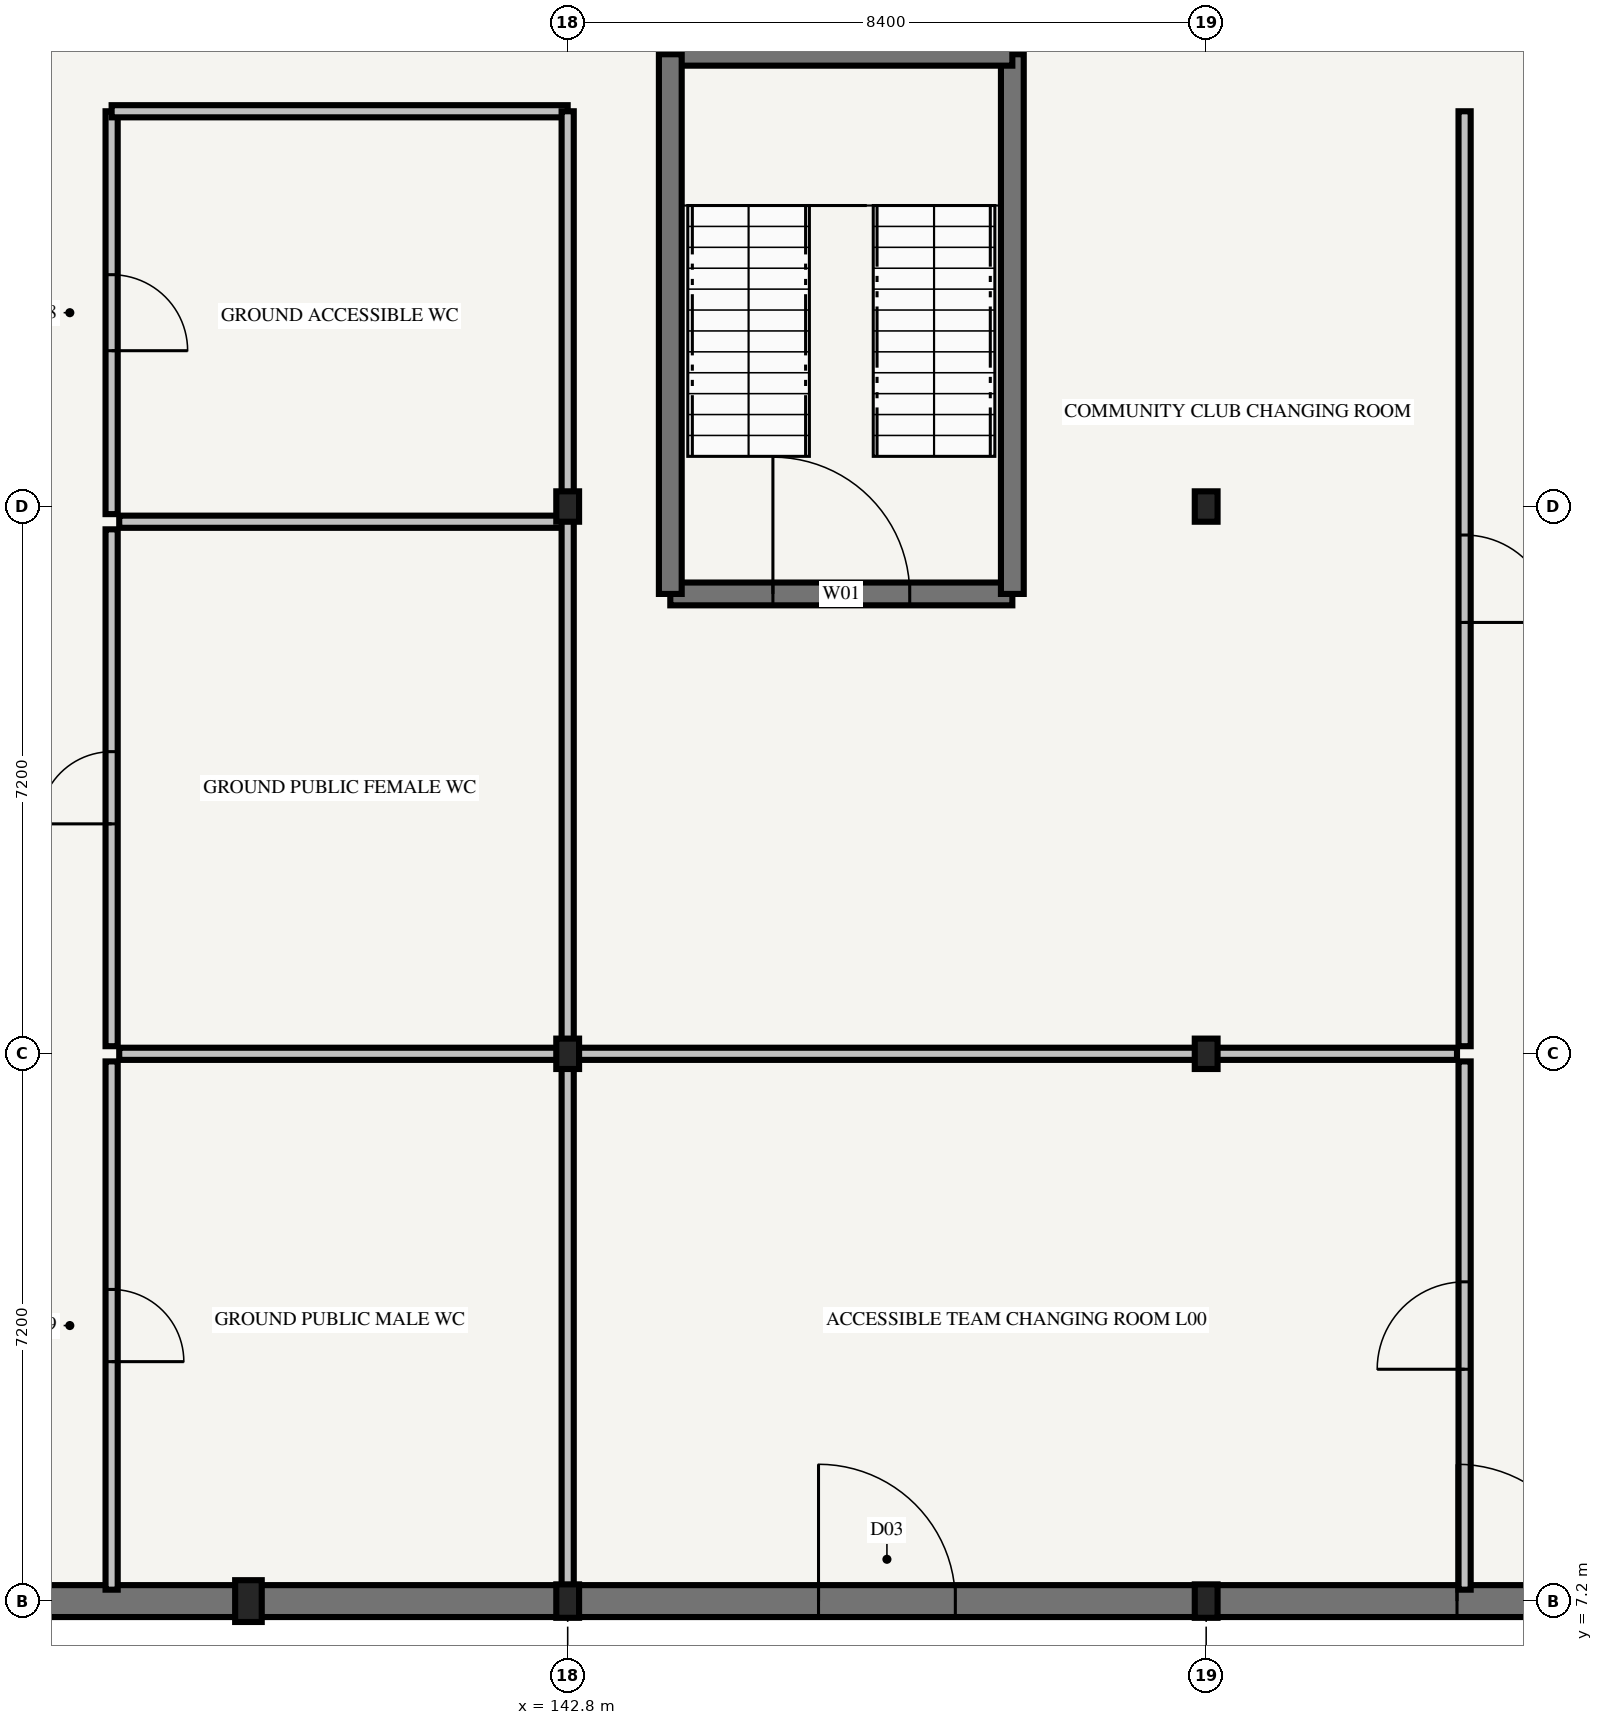
"""IFC4 building model, lengths in metres.
Left out: names, types, materials, properties, quantities, classifications, styles, units other than length and angle.
Written with IfcOpenShell. Run it as: python <this file> out.ifc"""

import sys

from ifc_helpers import new_model, si_unit, direction, frame, frame_2d, origin, origin_2d, place, context, subcontext, project, spatial, rectangle, i_section, extrude, element, fill, save


model = new_model("IFC4")
c1 = context("Model", 3, precision=1e-05, world=origin(), true_north=direction((0.0, 1.0)))
c2 = subcontext(c1, "Body", "Model", "MODEL_VIEW")
j1 = project(units=[si_unit("LENGTHUNIT", "METRE"), si_unit("PLANEANGLEUNIT", "RADIAN")], contexts=[c1])
p1 = place(None, origin())
s1 = spatial("IfcSite", under=j1, at=p1, CompositionType="ELEMENT")
p2 = place(p1, origin())
s2 = spatial("IfcBuilding", under=s1, at=p2, CompositionType="ELEMENT")
p3 = place(p2, origin())
s3 = spatial("IfcBuildingStorey", under=s2, at=p3, CompositionType="ELEMENT", Elevation=0.0)
p4 = place(p3, frame((142.8, 7.2, -0.42), z_axis=(0.0, 0.0, 1.0), x_axis=(1.0, 0.0, 0.0)))
e1 = element("IfcColumn", 1, at=p4, inside=s3, PredefinedType="COLUMN", context=c2, shape_type="SweptSolid", body=[
    extrude(i_section(OverallWidth=0.3, OverallDepth=0.44, WebThickness=0.011, FlangeThickness=0.021, FilletRadius=0.027, at=origin_2d()), origin(), (0.0, 0.0, 1.0), 4.92),
])
for number, where, z_axis, x_axis in (
    (2, (142.8, 14.4, -0.42), (0.0, 0.0, 1.0), (1.0, 0.0, 0.0)),
    (3, (142.8, 21.6, -0.42), (0.0, 0.0, 1.0), (1.0, 0.0, 0.0)),
):
    element("IfcColumn", number, at=place(p3, frame(where, z_axis=z_axis, x_axis=x_axis)), inside=s3, PredefinedType="COLUMN", context=c2, shape_type="SweptSolid", body=[
        extrude(i_section(OverallWidth=0.3, OverallDepth=0.4, WebThickness=0.013, FlangeThickness=0.024, FilletRadius=0.027, at=origin_2d()), origin(), (0.0, 0.0, 1.0), 4.92),
    ])
p5 = place(p3, frame((151.2, 7.2, -0.42), z_axis=(0.0, 0.0, 1.0), x_axis=(1.0, 0.0, 0.0)))
e4 = element("IfcColumn", 4, at=p5, inside=s3, PredefinedType="COLUMN", context=c2, shape_type="SweptSolid", body=[
    extrude(i_section(OverallWidth=0.3, OverallDepth=0.44, WebThickness=0.011, FlangeThickness=0.021, FilletRadius=0.027, at=origin_2d()), origin(), (0.0, 0.0, 1.0), 4.92),
])
for number, where, z_axis, x_axis in (
    (5, (151.2, 14.4, -0.42), (0.0, 0.0, 1.0), (1.0, 0.0, 0.0)),
    (6, (151.2, 21.6, -0.42), (0.0, 0.0, 1.0), (1.0, 0.0, 0.0)),
):
    element("IfcColumn", number, at=place(p3, frame(where, z_axis=z_axis, x_axis=x_axis)), inside=s3, PredefinedType="COLUMN", context=c2, shape_type="SweptSolid", body=[
        extrude(i_section(OverallWidth=0.3, OverallDepth=0.4, WebThickness=0.013, FlangeThickness=0.024, FilletRadius=0.027, at=origin_2d()), origin(), (0.0, 0.0, 1.0), 4.92),
    ])
p6 = place(p3, frame((138.6, 7.2, 0.0), z_axis=(0.0, 0.0, 1.0), x_axis=(1.0, 0.0, 0.0)))
e7 = element("IfcColumn", 7, at=p6, inside=s3, PredefinedType="PILASTER", context=c2, shape_type="SweptSolid", body=[
    extrude(rectangle(XDim=0.35, YDim=0.55, at=origin_2d()), origin(), (0.0, 0.0, 1.0), 4.5),
])
p7 = place(p3, frame((134.4, 7.2, 0.0), z_axis=(0.0, 0.0, 1.0), x_axis=(1.0, 0.0, 0.0)))
e8 = element("IfcWall", 8, at=p7, inside=s3, PredefinedType="SOLIDWALL", context=c2, shape_type="SweptSolid", body=[
    extrude(rectangle(XDim=8.4, YDim=0.42, at=frame_2d((4.2, 0.0))), origin(), (0.0, 0.0, 1.0), 3.855),
])
p8 = place(p3, frame((142.8, 7.2, 0.0), z_axis=(0.0, 0.0, 1.0), x_axis=(1.0, 0.0, 0.0)))
e9 = element("IfcWall", 9, at=p8, inside=s3, PredefinedType="SOLIDWALL", context=c2, shape_type="SweptSolid", body=[
    extrude(rectangle(XDim=8.4, YDim=0.42, at=frame_2d((4.2, 0.0))), origin(), (0.0, 0.0, 1.0), 3.805),
])
p9 = place(p8, frame((3.3, 0.0, 0.0)))
e10 = element("IfcOpeningElement", 10, at=p9, cuts=e9, PredefinedType="OPENING", context=c2, shape_type="SweptSolid", body=[
    extrude(rectangle(XDim=1.8, YDim=2.4, at=frame_2d((0.9, 1.2))), frame((0.0, 0.235, 0.0), z_axis=(0.0, -1.0, 0.0), x_axis=(1.0, 0.0, 0.0)), (0.0, 0.0, 1.0), 0.47),
])
p10 = place(p3, frame((151.2, 7.2, 0.0), z_axis=(0.0, 0.0, 1.0), x_axis=(1.0, 0.0, 0.0)))
e11 = element("IfcWall", 11, at=p10, inside=s3, PredefinedType="SOLIDWALL", context=c2, shape_type="SweptSolid", body=[
    extrude(rectangle(XDim=8.4, YDim=0.42, at=frame_2d((4.2, 0.0))), origin(), (0.0, 0.0, 1.0), 3.805),
])
p11 = place(p10, frame((3.3, 0.0, 0.0)))
e12 = element("IfcOpeningElement", 12, at=p11, cuts=e11, PredefinedType="OPENING", context=c2, shape_type="SweptSolid", body=[
    extrude(rectangle(XDim=1.8, YDim=2.4, at=frame_2d((0.9, 1.2))), frame((0.0, 0.235, 0.0), z_axis=(0.0, -1.0, 0.0), x_axis=(1.0, 0.0, 0.0)), (0.0, 0.0, 1.0), 0.47),
])
p12 = place(p3, frame((144.15, 20.45, 0.0), z_axis=(0.0, 0.0, 1.0), x_axis=(1.0, 0.0, 0.0)))
e13 = element("IfcWall", 13, at=p12, inside=s3, PredefinedType="SHEAR", context=c2, shape_type="SweptSolid", body=[
    extrude(rectangle(XDim=4.5, YDim=0.3, at=frame_2d((2.25, 0.0))), origin(), (0.0, 0.0, 1.0), 4.32),
])
p13 = place(p12, frame((1.35, 0.0, 0.0)))
e14 = element("IfcOpeningElement", 14, at=p13, cuts=e13, PredefinedType="OPENING", context=c2, shape_type="SweptSolid", body=[
    extrude(rectangle(XDim=1.8, YDim=2.2, at=frame_2d((0.9, 1.1))), frame((0.0, 0.175, 0.0), z_axis=(0.0, -1.0, 0.0), x_axis=(1.0, 0.0, 0.0)), (0.0, 0.0, 1.0), 0.35),
])
p14 = place(p3, frame((148.65, 20.45, 0.0), z_axis=(0.0, 0.0, 1.0), x_axis=(0.0, 1.0, 0.0)))
e15 = element("IfcWall", 15, at=p14, inside=s3, PredefinedType="SHEAR", context=c2, shape_type="SweptSolid", body=[
    extrude(rectangle(XDim=7.1, YDim=0.3, at=frame_2d((3.55, 0.0))), origin(), (0.0, 0.0, 1.0), 4.32),
])
p15 = place(p3, frame((148.65, 27.55, 0.0), z_axis=(0.0, 0.0, 1.0), x_axis=(-1.0, 0.0, 0.0)))
e16 = element("IfcWall", 16, at=p15, inside=s3, PredefinedType="SHEAR", context=c2, shape_type="SweptSolid", body=[
    extrude(rectangle(XDim=4.5, YDim=0.3, at=frame_2d((2.25, 0.0))), origin(), (0.0, 0.0, 1.0), 4.32),
])
p16 = place(p3, frame((144.15, 27.55, 0.0), z_axis=(0.0, 0.0, 1.0), x_axis=(0.0, -1.0, 0.0)))
e17 = element("IfcWall", 17, at=p16, inside=s3, PredefinedType="SHEAR", context=c2, shape_type="SweptSolid", body=[
    extrude(rectangle(XDim=7.1, YDim=0.3, at=frame_2d((3.55, 0.0))), origin(), (0.0, 0.0, 1.0), 4.32),
])
p17 = place(p3, frame((136.8, 7.35, 0.0), z_axis=(0.0, 0.0, 1.0), x_axis=(0.0, 1.0, 0.0)))
e18 = element("IfcWall", 18, at=p17, inside=s3, PredefinedType="PARTITIONING", context=c2, shape_type="SweptSolid", body=[
    extrude(rectangle(XDim=6.95, YDim=0.16, at=frame_2d((3.475, 0.0))), origin(), (0.0, 0.0, 1.0), 3.62),
])
p18 = place(p17, frame((3.0, 0.0, 0.0)))
e19 = element("IfcOpeningElement", 19, at=p18, cuts=e18, PredefinedType="OPENING", context=c2, shape_type="SweptSolid", body=[
    extrude(rectangle(XDim=0.95, YDim=2.15, at=frame_2d((0.475, 1.075))), frame((0.0, 0.105, 0.0), z_axis=(0.0, -1.0, 0.0), x_axis=(1.0, 0.0, 0.0)), (0.0, 0.0, 1.0), 0.21),
])
p19 = place(p3, frame((136.8, 14.5, 0.0), z_axis=(0.0, 0.0, 1.0), x_axis=(0.0, 1.0, 0.0)))
e20 = element("IfcWall", 20, at=p19, inside=s3, PredefinedType="PARTITIONING", context=c2, shape_type="SweptSolid", body=[
    extrude(rectangle(XDim=6.8, YDim=0.16, at=frame_2d((3.4, 0.0))), origin(), (0.0, 0.0, 1.0), 3.62),
])
p20 = place(p19, frame((2.925, 0.0, 0.0)))
e21 = element("IfcOpeningElement", 21, at=p20, cuts=e20, PredefinedType="OPENING", context=c2, shape_type="SweptSolid", body=[
    extrude(rectangle(XDim=0.95, YDim=2.15, at=frame_2d((0.475, 1.075))), frame((0.0, 0.105, 0.0), z_axis=(0.0, -1.0, 0.0), x_axis=(1.0, 0.0, 0.0)), (0.0, 0.0, 1.0), 0.21),
])
p21 = place(p3, frame((136.8, 21.5, 0.0), z_axis=(0.0, 0.0, 1.0), x_axis=(0.0, 1.0, 0.0)))
e22 = element("IfcWall", 22, at=p21, inside=s3, PredefinedType="PARTITIONING", context=c2, shape_type="SweptSolid", body=[
    extrude(rectangle(XDim=5.3, YDim=0.16, at=frame_2d((2.65, 0.0))), origin(), (0.0, 0.0, 1.0), 3.62),
])
p22 = place(p21, frame((2.15, 0.0, 0.0)))
e23 = element("IfcOpeningElement", 23, at=p22, cuts=e22, PredefinedType="OPENING", context=c2, shape_type="SweptSolid", body=[
    extrude(rectangle(XDim=1.0, YDim=2.15, at=frame_2d((0.5, 1.075))), frame((0.0, 0.105, 0.0), z_axis=(0.0, -1.0, 0.0), x_axis=(1.0, 0.0, 0.0)), (0.0, 0.0, 1.0), 0.21),
])
for number, where, z_axis, x_axis in (
    (24, (136.9, 14.4, 0.0), (0.0, 0.0, 1.0), (1.0, 0.0, 0.0)),
    (25, (136.9, 21.4, 0.0), (0.0, 0.0, 1.0), (1.0, 0.0, 0.0)),
):
    element("IfcWall", number, at=place(p3, frame(where, z_axis=z_axis, x_axis=x_axis)), inside=s3, PredefinedType="PARTITIONING", context=c2, shape_type="SweptSolid", body=[
        extrude(rectangle(XDim=5.9, YDim=0.16, at=frame_2d((2.95, 0.0))), origin(), (0.0, 0.0, 1.0), 3.62),
    ])
p23 = place(p3, frame((136.8, 26.8, 0.0), z_axis=(0.0, 0.0, 1.0), x_axis=(1.0, 0.0, 0.0)))
e26 = element("IfcWall", 26, at=p23, inside=s3, PredefinedType="PARTITIONING", context=c2, shape_type="SweptSolid", body=[
    extrude(rectangle(XDim=6.0, YDim=0.16, at=frame_2d((3.0, 0.0))), origin(), (0.0, 0.0, 1.0), 3.62),
])
p24 = place(p3, frame((142.8, 7.35, 0.0), z_axis=(0.0, 0.0, 1.0), x_axis=(0.0, 1.0, 0.0)))
e27 = element("IfcWall", 27, at=p24, inside=s3, PredefinedType="PARTITIONING", context=c2, shape_type="SweptSolid", body=[
    extrude(rectangle(XDim=19.45, YDim=0.16, at=frame_2d((9.725, 0.0))), origin(), (0.0, 0.0, 1.0), 3.62),
])
p25 = place(p3, frame((154.6, 7.35, 0.0), z_axis=(0.0, 0.0, 1.0), x_axis=(0.0, 1.0, 0.0)))
e28 = element("IfcWall", 28, at=p25, inside=s3, PredefinedType="PARTITIONING", context=c2, shape_type="SweptSolid", body=[
    extrude(rectangle(XDim=6.95, YDim=0.16, at=frame_2d((3.475, 0.0))), origin(), (0.0, 0.0, 1.0), 3.62),
])
p26 = place(p25, frame((2.9, 0.0, 0.0)))
e29 = element("IfcOpeningElement", 29, at=p26, cuts=e28, PredefinedType="OPENING", context=c2, shape_type="SweptSolid", body=[
    extrude(rectangle(XDim=1.15, YDim=2.15, at=frame_2d((0.575, 1.075))), frame((0.0, 0.105, 0.0), z_axis=(0.0, -1.0, 0.0), x_axis=(1.0, 0.0, 0.0)), (0.0, 0.0, 1.0), 0.21),
])
p27 = place(p3, frame((154.6, 14.5, 0.0), z_axis=(0.0, 0.0, 1.0), x_axis=(0.0, 1.0, 0.0)))
e30 = element("IfcWall", 30, at=p27, inside=s3, PredefinedType="PARTITIONING", context=c2, shape_type="SweptSolid", body=[
    extrude(rectangle(XDim=12.3, YDim=0.16, at=frame_2d((6.15, 0.0))), origin(), (0.0, 0.0, 1.0), 3.62),
])
p28 = place(p27, frame((5.575, 0.0, 0.0)))
e31 = element("IfcOpeningElement", 31, at=p28, cuts=e30, PredefinedType="OPENING", context=c2, shape_type="SweptSolid", body=[
    extrude(rectangle(XDim=1.15, YDim=2.15, at=frame_2d((0.575, 1.075))), frame((0.0, 0.105, 0.0), z_axis=(0.0, -1.0, 0.0), x_axis=(1.0, 0.0, 0.0)), (0.0, 0.0, 1.0), 0.21),
])
p29 = place(p3, frame((142.9, 14.4, 0.0), z_axis=(0.0, 0.0, 1.0), x_axis=(1.0, 0.0, 0.0)))
e32 = element("IfcWall", 32, at=p29, inside=s3, PredefinedType="PARTITIONING", context=c2, shape_type="SweptSolid", body=[
    extrude(rectangle(XDim=11.6, YDim=0.16, at=frame_2d((5.8, 0.0))), origin(), (0.0, 0.0, 1.0), 3.62),
])
p30 = place(p9, frame((1.8, 0.0, 0.0), z_axis=(0.0, 0.0, 1.0), x_axis=(-1.0, 0.0, 0.0)))
e33 = element("IfcDoor", 33, at=p30, inside=s3, OperationType="DOUBLE_DOOR_SINGLE_SWING", PredefinedType="DOOR", context=c2, shape_type="SweptSolid", body=[
    extrude(rectangle(XDim=1.8, YDim=2.4, at=frame_2d((0.9, 1.2))), frame((0.0, 0.025, 0.0), z_axis=(0.0, -1.0, 0.0), x_axis=(1.0, 0.0, 0.0)), (0.0, 0.0, 1.0), 0.05),
])
fill(e10, e33)
p31 = place(p11, frame((1.8, 0.0, 0.0), z_axis=(0.0, 0.0, 1.0), x_axis=(-1.0, 0.0, 0.0)))
e34 = element("IfcDoor", 34, at=p31, inside=s3, OperationType="DOUBLE_DOOR_SINGLE_SWING", PredefinedType="DOOR", context=c2, shape_type="SweptSolid", body=[
    extrude(rectangle(XDim=1.8, YDim=2.4, at=frame_2d((0.9, 1.2))), frame((0.0, 0.025, 0.0), z_axis=(0.0, -1.0, 0.0), x_axis=(1.0, 0.0, 0.0)), (0.0, 0.0, 1.0), 0.05),
])
fill(e12, e34)
p32 = place(p13, frame((1.8, 0.0, 0.0), z_axis=(0.0, 0.0, 1.0), x_axis=(-1.0, 0.0, 0.0)))
e35 = element("IfcDoor", 35, at=p32, inside=s3, OperationType="DOUBLE_DOOR_SINGLE_SWING", PredefinedType="DOOR", context=c2, shape_type="SweptSolid", body=[
    extrude(rectangle(XDim=1.8, YDim=2.2, at=frame_2d((0.9, 1.1))), frame((0.0, 0.025, 0.0), z_axis=(0.0, -1.0, 0.0), x_axis=(1.0, 0.0, 0.0)), (0.0, 0.0, 1.0), 0.05),
])
fill(e14, e35)
p33 = place(p18, frame((0.95, 0.0, 0.0), z_axis=(0.0, 0.0, 1.0), x_axis=(-1.0, 0.0, 0.0)))
e36 = element("IfcDoor", 36, at=p33, inside=s3, OperationType="SINGLE_SWING_RIGHT", PredefinedType="DOOR", context=c2, shape_type="SweptSolid", body=[
    extrude(rectangle(XDim=0.95, YDim=2.15, at=frame_2d((0.475, 1.075))), frame((0.0, 0.025, 0.0), z_axis=(0.0, -1.0, 0.0), x_axis=(1.0, 0.0, 0.0)), (0.0, 0.0, 1.0), 0.05),
])
fill(e19, e36)
p34 = place(p20, origin())
e37 = element("IfcDoor", 37, at=p34, inside=s3, OperationType="SINGLE_SWING_LEFT", PredefinedType="DOOR", context=c2, shape_type="SweptSolid", body=[
    extrude(rectangle(XDim=0.95, YDim=2.15, at=frame_2d((0.475, 1.075))), frame((0.0, 0.025, 0.0), z_axis=(0.0, -1.0, 0.0), x_axis=(1.0, 0.0, 0.0)), (0.0, 0.0, 1.0), 0.05),
])
fill(e21, e37)
p35 = place(p22, origin())
e38 = element("IfcDoor", 38, at=p35, inside=s3, OperationType="SINGLE_SWING_RIGHT", PredefinedType="DOOR", context=c2, shape_type="SweptSolid", body=[
    extrude(rectangle(XDim=1.0, YDim=2.15, at=frame_2d((0.5, 1.075))), frame((0.0, 0.025, 0.0), z_axis=(0.0, -1.0, 0.0), x_axis=(1.0, 0.0, 0.0)), (0.0, 0.0, 1.0), 0.05),
])
fill(e23, e38)
p36 = place(p26, frame((1.15, 0.0, 0.0), z_axis=(0.0, 0.0, 1.0), x_axis=(-1.0, 0.0, 0.0)))
e39 = element("IfcDoor", 39, at=p36, inside=s3, OperationType="SINGLE_SWING_LEFT", PredefinedType="DOOR", context=c2, shape_type="SweptSolid", body=[
    extrude(rectangle(XDim=1.15, YDim=2.15, at=frame_2d((0.575, 1.075))), frame((0.0, 0.025, 0.0), z_axis=(0.0, -1.0, 0.0), x_axis=(1.0, 0.0, 0.0)), (0.0, 0.0, 1.0), 0.05),
])
fill(e29, e39)
p37 = place(p28, origin())
e40 = element("IfcDoor", 40, at=p37, inside=s3, OperationType="SINGLE_SWING_RIGHT", PredefinedType="DOOR", context=c2, shape_type="SweptSolid", body=[
    extrude(rectangle(XDim=1.15, YDim=2.15, at=frame_2d((0.575, 1.075))), frame((0.0, 0.025, 0.0), z_axis=(0.0, -1.0, 0.0), x_axis=(1.0, 0.0, 0.0)), (0.0, 0.0, 1.0), 0.05),
])
fill(e31, e40)
save(model, sys.argv[1])
